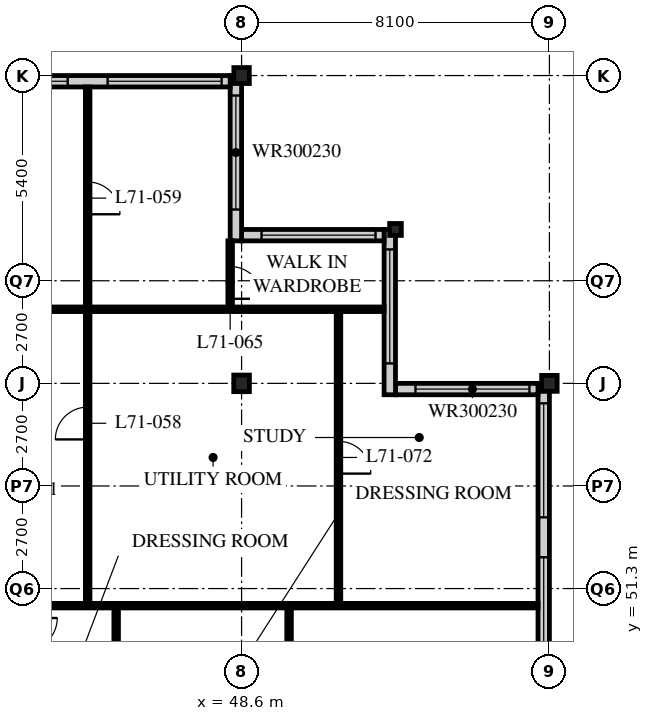
"""IFC4 building model, lengths in metres.
Left out: names, types, materials, properties, quantities, classifications, styles, units other than length and angle.
Written with IfcOpenShell. Run it as: python <this file> out.ifc"""

import sys

from ifc_helpers import new_model, si_unit, direction, frame, frame_2d, origin, origin_2d, place, context, subcontext, project, spatial, rectangle, i_section, extrude, element, fill, save


model = new_model("IFC4")
c1 = context("Model", 3, precision=1e-05, world=origin(), true_north=direction((0.0, 1.0)))
c2 = subcontext(c1, "Body", "Model", "MODEL_VIEW")
j1 = project(units=[si_unit("LENGTHUNIT", "METRE"), si_unit("PLANEANGLEUNIT", "RADIAN")], contexts=[c1])
p1 = place(None, origin())
s1 = spatial("IfcSite", under=j1, at=p1, CompositionType="ELEMENT")
p2 = place(p1, origin())
s2 = spatial("IfcBuilding", under=s1, at=p2, CompositionType="ELEMENT")
p3 = place(p2, frame((0.0, 0.0, 277.5)))
s3 = spatial("IfcBuildingStorey", under=s2, at=p3, CompositionType="ELEMENT", Elevation=277.5)
p4 = place(p3, frame((48.6, 56.7, 0.0), z_axis=(0.0, 0.0, 1.0), x_axis=(1.0, 0.0, 0.0)))
e1 = element("IfcColumn", 1, at=p4, inside=s3, PredefinedType="COLUMN", context=c2, shape_type="SweptSolid", body=[
    extrude(i_section(OverallWidth=0.412, OverallDepth=0.437, WebThickness=0.036, FlangeThickness=0.058, FilletRadius=0.015, at=origin_2d()), origin(), (0.0, 0.0, 1.0), 3.9),
])
p5 = place(p3, frame((48.6, 64.8, 0.0), z_axis=(0.0, 0.0, 1.0), x_axis=(1.0, 0.0, 0.0)))
e2 = element("IfcColumn", 2, at=p5, inside=s3, PredefinedType="COLUMN", context=c2, shape_type="SweptSolid", body=[
    extrude(i_section(OverallWidth=0.407, OverallDepth=0.419, WebThickness=0.031, FlangeThickness=0.049, FilletRadius=0.015, at=origin_2d()), origin(), (0.0, 0.0, 1.0), 3.9),
])
p6 = place(p3, frame((52.65, 60.75, 0.0), z_axis=(0.0, 0.0, 1.0), x_axis=(1.0, 0.0, 0.0)))
e3 = element("IfcColumn", 3, at=p6, inside=s3, PredefinedType="COLUMN", context=c2, shape_type="SweptSolid", body=[
    extrude(i_section(OverallWidth=0.307, OverallDepth=0.314, WebThickness=0.012, FlangeThickness=0.019, FilletRadius=0.015, at=origin_2d()), origin(), (0.0, 0.0, 1.0), 3.9),
])
p7 = place(p3, frame((56.7, 56.7, 0.0), z_axis=(0.0, 0.0, 1.0), x_axis=(1.0, 0.0, 0.0)))
e4 = element("IfcColumn", 4, at=p7, inside=s3, PredefinedType="COLUMN", context=c2, shape_type="SweptSolid", body=[
    extrude(i_section(OverallWidth=0.407, OverallDepth=0.419, WebThickness=0.031, FlangeThickness=0.049, FilletRadius=0.015, at=origin_2d()), origin(), (0.0, 0.0, 1.0), 3.9),
])
p8 = place(p3, frame((56.55, 24.6, 0.0), z_axis=(0.0, 0.0, 1.0), x_axis=(0.0, 1.0, 0.0)))
e5 = element("IfcWall", 5, at=p8, inside=s3, PredefinedType="SOLIDWALL", context=c2, shape_type="SweptSolid", body=[
    extrude(rectangle(XDim=32.1, YDim=0.3, at=frame_2d((16.05, 0.0))), origin(), (0.0, 0.0, 1.0), 3.69),
])
p9 = place(p8, frame((0.225, 0.0, 0.6)))
e6 = element("IfcOpeningElement", 6, at=p9, cuts=e5, PredefinedType="OPENING", context=c2, shape_type="SweptSolid", body=[
    extrude(rectangle(XDim=3.0, YDim=2.4, at=frame_2d((1.5, 1.2))), frame((0.0, 0.16, 0.0), z_axis=(0.0, -1.0, 0.0), x_axis=(1.0, 0.0, 0.0)), (0.0, 0.0, 1.0), 0.32),
])
p10 = place(p8, frame((4.275, 0.0, 0.6)))
e7 = element("IfcOpeningElement", 7, at=p10, cuts=e5, PredefinedType="OPENING", context=c2, shape_type="SweptSolid", body=[
    extrude(rectangle(XDim=3.0, YDim=2.4, at=frame_2d((1.5, 1.2))), frame((0.0, 0.16, 0.0), z_axis=(0.0, -1.0, 0.0), x_axis=(1.0, 0.0, 0.0)), (0.0, 0.0, 1.0), 0.32),
])
p11 = place(p8, frame((8.325, 0.0, 0.6)))
e8 = element("IfcOpeningElement", 8, at=p11, cuts=e5, PredefinedType="OPENING", context=c2, shape_type="SweptSolid", body=[
    extrude(rectangle(XDim=3.0, YDim=2.4, at=frame_2d((1.5, 1.2))), frame((0.0, 0.16, 0.0), z_axis=(0.0, -1.0, 0.0), x_axis=(1.0, 0.0, 0.0)), (0.0, 0.0, 1.0), 0.32),
])
p12 = place(p8, frame((12.375, 0.0, 0.6)))
e9 = element("IfcOpeningElement", 9, at=p12, cuts=e5, PredefinedType="OPENING", context=c2, shape_type="SweptSolid", body=[
    extrude(rectangle(XDim=3.0, YDim=2.4, at=frame_2d((1.5, 1.2))), frame((0.0, 0.16, 0.0), z_axis=(0.0, -1.0, 0.0), x_axis=(1.0, 0.0, 0.0)), (0.0, 0.0, 1.0), 0.32),
])
p13 = place(p8, frame((16.425, 0.0, 0.6)))
e10 = element("IfcOpeningElement", 10, at=p13, cuts=e5, PredefinedType="OPENING", context=c2, shape_type="SweptSolid", body=[
    extrude(rectangle(XDim=3.0, YDim=2.4, at=frame_2d((1.5, 1.2))), frame((0.0, 0.16, 0.0), z_axis=(0.0, -1.0, 0.0), x_axis=(1.0, 0.0, 0.0)), (0.0, 0.0, 1.0), 0.32),
])
p14 = place(p8, frame((20.475, 0.0, 0.6)))
e11 = element("IfcOpeningElement", 11, at=p14, cuts=e5, PredefinedType="OPENING", context=c2, shape_type="SweptSolid", body=[
    extrude(rectangle(XDim=3.0, YDim=2.4, at=frame_2d((1.5, 1.2))), frame((0.0, 0.16, 0.0), z_axis=(0.0, -1.0, 0.0), x_axis=(1.0, 0.0, 0.0)), (0.0, 0.0, 1.0), 0.32),
])
p15 = place(p8, frame((24.525, 0.0, 0.6)))
e12 = element("IfcOpeningElement", 12, at=p15, cuts=e5, PredefinedType="OPENING", context=c2, shape_type="SweptSolid", body=[
    extrude(rectangle(XDim=3.0, YDim=2.4, at=frame_2d((1.5, 1.2))), frame((0.0, 0.16, 0.0), z_axis=(0.0, -1.0, 0.0), x_axis=(1.0, 0.0, 0.0)), (0.0, 0.0, 1.0), 0.32),
])
p16 = place(p8, frame((28.575, 0.0, 0.6)))
e13 = element("IfcOpeningElement", 13, at=p16, cuts=e5, PredefinedType="OPENING", context=c2, shape_type="SweptSolid", body=[
    extrude(rectangle(XDim=3.0, YDim=2.4, at=frame_2d((1.5, 1.2))), frame((0.0, 0.16, 0.0), z_axis=(0.0, -1.0, 0.0), x_axis=(1.0, 0.0, 0.0)), (0.0, 0.0, 1.0), 0.32),
])
p17 = place(p3, frame((56.4, 56.55, 0.0), z_axis=(0.0, 0.0, 1.0), x_axis=(-1.0, 0.0, 0.0)))
e14 = element("IfcWall", 14, at=p17, inside=s3, PredefinedType="SOLIDWALL", context=c2, shape_type="SweptSolid", body=[
    extrude(rectangle(XDim=3.75, YDim=0.3, at=frame_2d((1.875, 0.0))), origin(), (0.0, 0.0, 1.0), 3.69),
])
p18 = place(p17, frame((0.225, 0.0, 0.6)))
e15 = element("IfcOpeningElement", 15, at=p18, cuts=e14, PredefinedType="OPENING", context=c2, shape_type="SweptSolid", body=[
    extrude(rectangle(XDim=3.0, YDim=2.3, at=frame_2d((1.5, 1.15))), frame((0.0, 0.16, 0.0), z_axis=(0.0, -1.0, 0.0), x_axis=(1.0, 0.0, 0.0)), (0.0, 0.0, 1.0), 0.32),
])
p19 = place(p3, frame((52.5, 56.4, 0.0), z_axis=(0.0, 0.0, 1.0), x_axis=(0.0, 1.0, 0.0)))
e16 = element("IfcWall", 16, at=p19, inside=s3, PredefinedType="SOLIDWALL", context=c2, shape_type="SweptSolid", body=[
    extrude(rectangle(XDim=4.35, YDim=0.3, at=frame_2d((2.175, 0.0))), origin(), (0.0, 0.0, 1.0), 3.69),
])
p20 = place(p19, frame((0.825, 0.0, 0.6)))
e17 = element("IfcOpeningElement", 17, at=p20, cuts=e16, PredefinedType="OPENING", context=c2, shape_type="SweptSolid", body=[
    extrude(rectangle(XDim=3.0, YDim=2.3, at=frame_2d((1.5, 1.15))), frame((0.0, 0.16, 0.0), z_axis=(0.0, -1.0, 0.0), x_axis=(1.0, 0.0, 0.0)), (0.0, 0.0, 1.0), 0.32),
])
p21 = place(p3, frame((52.35, 60.6, 0.0), z_axis=(0.0, 0.0, 1.0), x_axis=(-1.0, 0.0, 0.0)))
e18 = element("IfcWall", 18, at=p21, inside=s3, PredefinedType="SOLIDWALL", context=c2, shape_type="SweptSolid", body=[
    extrude(rectangle(XDim=3.75, YDim=0.3, at=frame_2d((1.875, 0.0))), origin(), (0.0, 0.0, 1.0), 3.69),
])
p22 = place(p21, frame((0.225, 0.0, 0.6)))
e19 = element("IfcOpeningElement", 19, at=p22, cuts=e18, PredefinedType="OPENING", context=c2, shape_type="SweptSolid", body=[
    extrude(rectangle(XDim=3.0, YDim=2.3, at=frame_2d((1.5, 1.15))), frame((0.0, 0.16, 0.0), z_axis=(0.0, -1.0, 0.0), x_axis=(1.0, 0.0, 0.0)), (0.0, 0.0, 1.0), 0.32),
])
p23 = place(p3, frame((48.45, 60.45, 0.0), z_axis=(0.0, 0.0, 1.0), x_axis=(0.0, 1.0, 0.0)))
e20 = element("IfcWall", 20, at=p23, inside=s3, PredefinedType="SOLIDWALL", context=c2, shape_type="SweptSolid", body=[
    extrude(rectangle(XDim=4.35, YDim=0.3, at=frame_2d((2.175, 0.0))), origin(), (0.0, 0.0, 1.0), 3.69),
])
p24 = place(p23, frame((0.825, 0.0, 0.6)))
e21 = element("IfcOpeningElement", 21, at=p24, cuts=e20, PredefinedType="OPENING", context=c2, shape_type="SweptSolid", body=[
    extrude(rectangle(XDim=3.0, YDim=2.3, at=frame_2d((1.5, 1.15))), frame((0.0, 0.16, 0.0), z_axis=(0.0, -1.0, 0.0), x_axis=(1.0, 0.0, 0.0)), (0.0, 0.0, 1.0), 0.32),
])
p25 = place(p3, frame((48.3, 64.65, 0.0), z_axis=(0.0, 0.0, 1.0), x_axis=(-1.0, 0.0, 0.0)))
e22 = element("IfcWall", 22, at=p25, inside=s3, PredefinedType="SOLIDWALL", context=c2, shape_type="SweptSolid", body=[
    extrude(rectangle(XDim=40.2, YDim=0.3, at=frame_2d((20.1, 0.0))), origin(), (0.0, 0.0, 1.0), 3.69),
])
p26 = place(p25, frame((0.225, 0.0, 0.6)))
e23 = element("IfcOpeningElement", 23, at=p26, cuts=e22, PredefinedType="OPENING", context=c2, shape_type="SweptSolid", body=[
    extrude(rectangle(XDim=3.0, YDim=2.4, at=frame_2d((1.5, 1.2))), frame((0.0, 0.16, 0.0), z_axis=(0.0, -1.0, 0.0), x_axis=(1.0, 0.0, 0.0)), (0.0, 0.0, 1.0), 0.32),
])
p27 = place(p25, frame((4.275, 0.0, 0.6)))
e24 = element("IfcOpeningElement", 24, at=p27, cuts=e22, PredefinedType="OPENING", context=c2, shape_type="SweptSolid", body=[
    extrude(rectangle(XDim=3.0, YDim=2.4, at=frame_2d((1.5, 1.2))), frame((0.0, 0.16, 0.0), z_axis=(0.0, -1.0, 0.0), x_axis=(1.0, 0.0, 0.0)), (0.0, 0.0, 1.0), 0.32),
])
p28 = place(p25, frame((8.325, 0.0, 0.6)))
e25 = element("IfcOpeningElement", 25, at=p28, cuts=e22, PredefinedType="OPENING", context=c2, shape_type="SweptSolid", body=[
    extrude(rectangle(XDim=3.0, YDim=2.4, at=frame_2d((1.5, 1.2))), frame((0.0, 0.16, 0.0), z_axis=(0.0, -1.0, 0.0), x_axis=(1.0, 0.0, 0.0)), (0.0, 0.0, 1.0), 0.32),
])
p29 = place(p25, frame((12.375, 0.0, 0.6)))
e26 = element("IfcOpeningElement", 26, at=p29, cuts=e22, PredefinedType="OPENING", context=c2, shape_type="SweptSolid", body=[
    extrude(rectangle(XDim=3.0, YDim=2.4, at=frame_2d((1.5, 1.2))), frame((0.0, 0.16, 0.0), z_axis=(0.0, -1.0, 0.0), x_axis=(1.0, 0.0, 0.0)), (0.0, 0.0, 1.0), 0.32),
])
p30 = place(p25, frame((16.425, 0.0, 0.6)))
e27 = element("IfcOpeningElement", 27, at=p30, cuts=e22, PredefinedType="OPENING", context=c2, shape_type="SweptSolid", body=[
    extrude(rectangle(XDim=3.0, YDim=2.4, at=frame_2d((1.5, 1.2))), frame((0.0, 0.16, 0.0), z_axis=(0.0, -1.0, 0.0), x_axis=(1.0, 0.0, 0.0)), (0.0, 0.0, 1.0), 0.32),
])
p31 = place(p25, frame((20.475, 0.0, 0.6)))
e28 = element("IfcOpeningElement", 28, at=p31, cuts=e22, PredefinedType="OPENING", context=c2, shape_type="SweptSolid", body=[
    extrude(rectangle(XDim=3.0, YDim=2.4, at=frame_2d((1.5, 1.2))), frame((0.0, 0.16, 0.0), z_axis=(0.0, -1.0, 0.0), x_axis=(1.0, 0.0, 0.0)), (0.0, 0.0, 1.0), 0.32),
])
p32 = place(p25, frame((24.525, 0.0, 0.6)))
e29 = element("IfcOpeningElement", 29, at=p32, cuts=e22, PredefinedType="OPENING", context=c2, shape_type="SweptSolid", body=[
    extrude(rectangle(XDim=3.0, YDim=2.4, at=frame_2d((1.5, 1.2))), frame((0.0, 0.16, 0.0), z_axis=(0.0, -1.0, 0.0), x_axis=(1.0, 0.0, 0.0)), (0.0, 0.0, 1.0), 0.32),
])
p33 = place(p25, frame((28.575, 0.0, 0.6)))
e30 = element("IfcOpeningElement", 30, at=p33, cuts=e22, PredefinedType="OPENING", context=c2, shape_type="SweptSolid", body=[
    extrude(rectangle(XDim=3.0, YDim=2.4, at=frame_2d((1.5, 1.2))), frame((0.0, 0.16, 0.0), z_axis=(0.0, -1.0, 0.0), x_axis=(1.0, 0.0, 0.0)), (0.0, 0.0, 1.0), 0.32),
])
p34 = place(p25, frame((32.625, 0.0, 0.6)))
e31 = element("IfcOpeningElement", 31, at=p34, cuts=e22, PredefinedType="OPENING", context=c2, shape_type="SweptSolid", body=[
    extrude(rectangle(XDim=3.0, YDim=2.4, at=frame_2d((1.5, 1.2))), frame((0.0, 0.16, 0.0), z_axis=(0.0, -1.0, 0.0), x_axis=(1.0, 0.0, 0.0)), (0.0, 0.0, 1.0), 0.32),
])
p35 = place(p25, frame((36.675, 0.0, 0.6)))
e32 = element("IfcOpeningElement", 32, at=p35, cuts=e22, PredefinedType="OPENING", context=c2, shape_type="SweptSolid", body=[
    extrude(rectangle(XDim=3.0, YDim=2.4, at=frame_2d((1.5, 1.2))), frame((0.0, 0.16, 0.0), z_axis=(0.0, -1.0, 0.0), x_axis=(1.0, 0.0, 0.0)), (0.0, 0.0, 1.0), 0.32),
])
p36 = place(p3, frame((42.9, 50.85, 0.0), z_axis=(0.0, 0.0, 1.0), x_axis=(1.0, 0.0, 0.0)))
e33 = element("IfcWall", 33, at=p36, inside=s3, PredefinedType="PARTITIONING", context=c2, shape_type="SweptSolid", body=[
    extrude(rectangle(XDim=13.5, YDim=0.12, at=frame_2d((6.75, 0.0))), origin(), (0.0, 0.0, 1.0), 3.69),
])
p37 = place(p3, frame((36.45, 58.65, 0.0), z_axis=(0.0, 0.0, 1.0), x_axis=(1.0, 0.0, 0.0)))
e34 = element("IfcWall", 34, at=p37, inside=s3, PredefinedType="PARTITIONING", context=c2, shape_type="SweptSolid", body=[
    extrude(rectangle(XDim=15.9, YDim=0.12, at=frame_2d((7.95, 0.0))), origin(), (0.0, 0.0, 1.0), 3.69),
])
p38 = place(p37, frame((1.675, 0.0, 0.0)))
e35 = element("IfcOpeningElement", 35, at=p38, cuts=e34, PredefinedType="OPENING", context=c2, shape_type="SweptSolid", body=[
    extrude(rectangle(XDim=0.85, YDim=2.1, at=frame_2d((0.425, 1.05))), frame((0.0, 0.07, 0.0), z_axis=(0.0, -1.0, 0.0), x_axis=(1.0, 0.0, 0.0)), (0.0, 0.0, 1.0), 0.14),
])
p39 = place(p3, frame((44.55, 64.5, 0.0), z_axis=(0.0, 0.0, 1.0), x_axis=(0.0, -1.0, 0.0)))
e36 = element("IfcWall", 36, at=p39, inside=s3, PredefinedType="PARTITIONING", context=c2, shape_type="SweptSolid", body=[
    extrude(rectangle(XDim=13.65, YDim=0.12, at=frame_2d((6.825, 0.0))), origin(), (0.0, 0.0, 1.0), 3.69),
])
p40 = place(p39, frame((8.425, 0.0, 0.0)))
e37 = element("IfcOpeningElement", 37, at=p40, cuts=e36, PredefinedType="OPENING", context=c2, shape_type="SweptSolid", body=[
    extrude(rectangle(XDim=0.85, YDim=2.1, at=frame_2d((0.425, 1.05))), frame((0.0, 0.07, 0.0), z_axis=(0.0, -1.0, 0.0), x_axis=(1.0, 0.0, 0.0)), (0.0, 0.0, 1.0), 0.14),
])
p41 = place(p39, frame((2.5, 0.0, 0.0)))
e38 = element("IfcOpeningElement", 38, at=p41, cuts=e36, PredefinedType="OPENING", context=c2, shape_type="SweptSolid", body=[
    extrude(rectangle(XDim=0.85, YDim=2.1, at=frame_2d((0.425, 1.05))), frame((0.0, 0.07, 0.0), z_axis=(0.0, -1.0, 0.0), x_axis=(1.0, 0.0, 0.0)), (0.0, 0.0, 1.0), 0.14),
])
p42 = place(p3, frame((48.3, 58.65, 0.0), z_axis=(0.0, 0.0, 1.0), x_axis=(0.0, 1.0, 0.0)))
e39 = element("IfcWall", 39, at=p42, inside=s3, PredefinedType="PARTITIONING", context=c2, shape_type="SweptSolid", body=[
    extrude(rectangle(XDim=1.8, YDim=0.12, at=frame_2d((0.9, 0.0))), origin(), (0.0, 0.0, 1.0), 3.69),
])
p43 = place(p42, frame((0.275, 0.0, 0.0)))
e40 = element("IfcOpeningElement", 40, at=p43, cuts=e39, PredefinedType="OPENING", context=c2, shape_type="SweptSolid", body=[
    extrude(rectangle(XDim=0.85, YDim=2.1, at=frame_2d((0.425, 1.05))), frame((0.0, 0.07, 0.0), z_axis=(0.0, -1.0, 0.0), x_axis=(1.0, 0.0, 0.0)), (0.0, 0.0, 1.0), 0.14),
])
p44 = place(p3, frame((45.3, 50.85, 0.0), z_axis=(0.0, 0.0, 1.0), x_axis=(0.0, -1.0, 0.0)))
e41 = element("IfcWall", 41, at=p44, inside=s3, PredefinedType="PARTITIONING", context=c2, shape_type="SweptSolid", body=[
    extrude(rectangle(XDim=4.01, YDim=0.12, at=frame_2d((2.005, 0.0))), origin(), (0.0, 0.0, 1.0), 3.69),
])
p45 = place(p44, frame((2.885, 0.0, 0.0)))
e42 = element("IfcOpeningElement", 42, at=p45, cuts=e41, PredefinedType="OPENING", context=c2, shape_type="SweptSolid", body=[
    extrude(rectangle(XDim=0.85, YDim=2.1, at=frame_2d((0.425, 1.05))), frame((0.0, 0.07, 0.0), z_axis=(0.0, -1.0, 0.0), x_axis=(1.0, 0.0, 0.0)), (0.0, 0.0, 1.0), 0.14),
])
p46 = place(p3, frame((51.15, 50.85, 0.0), z_axis=(0.0, 0.0, 1.0), x_axis=(0.0, 1.0, 0.0)))
e43 = element("IfcWall", 43, at=p46, inside=s3, PredefinedType="PARTITIONING", context=c2, shape_type="SweptSolid", body=[
    extrude(rectangle(XDim=7.8, YDim=0.12, at=frame_2d((3.9, 0.0))), origin(), (0.0, 0.0, 1.0), 3.69),
])
p47 = place(p46, frame((3.475, 0.0, 0.0)))
e44 = element("IfcOpeningElement", 44, at=p47, cuts=e43, PredefinedType="OPENING", context=c2, shape_type="SweptSolid", body=[
    extrude(rectangle(XDim=0.85, YDim=2.1, at=frame_2d((0.425, 1.05))), frame((0.0, 0.07, 0.0), z_axis=(0.0, -1.0, 0.0), x_axis=(1.0, 0.0, 0.0)), (0.0, 0.0, 1.0), 0.14),
])
p48 = place(p3, frame((49.85, 44.55, 0.0), z_axis=(0.0, 0.0, 1.0), x_axis=(0.0, 1.0, 0.0)))
e45 = element("IfcWall", 45, at=p48, inside=s3, PredefinedType="PARTITIONING", context=c2, shape_type="SweptSolid", body=[
    extrude(rectangle(XDim=6.3, YDim=0.12, at=frame_2d((3.15, 0.0))), origin(), (0.0, 0.0, 1.0), 3.69),
])
p49 = place(p48, frame((2.725, 0.0, 0.0)))
e46 = element("IfcOpeningElement", 46, at=p49, cuts=e45, PredefinedType="OPENING", context=c2, shape_type="SweptSolid", body=[
    extrude(rectangle(XDim=0.85, YDim=2.1, at=frame_2d((0.425, 1.05))), frame((0.0, 0.07, 0.0), z_axis=(0.0, -1.0, 0.0), x_axis=(1.0, 0.0, 0.0)), (0.0, 0.0, 1.0), 0.14),
])
p50 = place(p15, origin())
e47 = element("IfcWindow", 47, at=p50, inside=s3, PartitioningType="SINGLE_PANEL", PredefinedType="WINDOW", context=c2, shape_type="SweptSolid", body=[
    extrude(rectangle(XDim=3.0, YDim=2.4, at=frame_2d((1.5, 1.2))), frame((0.0, 0.03, 0.0), z_axis=(0.0, -1.0, 0.0), x_axis=(1.0, 0.0, 0.0)), (0.0, 0.0, 1.0), 0.06),
])
fill(e12, e47)
p51 = place(p16, origin())
e48 = element("IfcWindow", 48, at=p51, inside=s3, PartitioningType="SINGLE_PANEL", PredefinedType="WINDOW", context=c2, shape_type="SweptSolid", body=[
    extrude(rectangle(XDim=3.0, YDim=2.4, at=frame_2d((1.5, 1.2))), frame((0.0, 0.03, 0.0), z_axis=(0.0, -1.0, 0.0), x_axis=(1.0, 0.0, 0.0)), (0.0, 0.0, 1.0), 0.06),
])
fill(e13, e48)
p52 = place(p18, origin())
e49 = element("IfcWindow", 49, at=p52, inside=s3, PartitioningType="SINGLE_PANEL", PredefinedType="WINDOW", context=c2, shape_type="SweptSolid", body=[
    extrude(rectangle(XDim=3.0, YDim=2.3, at=frame_2d((1.5, 1.15))), frame((0.0, 0.03, 0.0), z_axis=(0.0, -1.0, 0.0), x_axis=(1.0, 0.0, 0.0)), (0.0, 0.0, 1.0), 0.06),
])
fill(e15, e49)
p53 = place(p20, origin())
e50 = element("IfcWindow", 50, at=p53, inside=s3, PartitioningType="SINGLE_PANEL", PredefinedType="WINDOW", context=c2, shape_type="SweptSolid", body=[
    extrude(rectangle(XDim=3.0, YDim=2.3, at=frame_2d((1.5, 1.15))), frame((0.0, 0.03, 0.0), z_axis=(0.0, -1.0, 0.0), x_axis=(1.0, 0.0, 0.0)), (0.0, 0.0, 1.0), 0.06),
])
fill(e17, e50)
p54 = place(p22, origin())
e51 = element("IfcWindow", 51, at=p54, inside=s3, PartitioningType="SINGLE_PANEL", PredefinedType="WINDOW", context=c2, shape_type="SweptSolid", body=[
    extrude(rectangle(XDim=3.0, YDim=2.3, at=frame_2d((1.5, 1.15))), frame((0.0, 0.03, 0.0), z_axis=(0.0, -1.0, 0.0), x_axis=(1.0, 0.0, 0.0)), (0.0, 0.0, 1.0), 0.06),
])
fill(e19, e51)
p55 = place(p24, origin())
e52 = element("IfcWindow", 52, at=p55, inside=s3, PartitioningType="SINGLE_PANEL", PredefinedType="WINDOW", context=c2, shape_type="SweptSolid", body=[
    extrude(rectangle(XDim=3.0, YDim=2.3, at=frame_2d((1.5, 1.15))), frame((0.0, 0.03, 0.0), z_axis=(0.0, -1.0, 0.0), x_axis=(1.0, 0.0, 0.0)), (0.0, 0.0, 1.0), 0.06),
])
fill(e21, e52)
p56 = place(p26, origin())
e53 = element("IfcWindow", 53, at=p56, inside=s3, PartitioningType="SINGLE_PANEL", PredefinedType="WINDOW", context=c2, shape_type="SweptSolid", body=[
    extrude(rectangle(XDim=3.0, YDim=2.4, at=frame_2d((1.5, 1.2))), frame((0.0, 0.03, 0.0), z_axis=(0.0, -1.0, 0.0), x_axis=(1.0, 0.0, 0.0)), (0.0, 0.0, 1.0), 0.06),
])
fill(e23, e53)
p57 = place(p27, origin())
e54 = element("IfcWindow", 54, at=p57, inside=s3, PartitioningType="SINGLE_PANEL", PredefinedType="WINDOW", context=c2, shape_type="SweptSolid", body=[
    extrude(rectangle(XDim=3.0, YDim=2.4, at=frame_2d((1.5, 1.2))), frame((0.0, 0.03, 0.0), z_axis=(0.0, -1.0, 0.0), x_axis=(1.0, 0.0, 0.0)), (0.0, 0.0, 1.0), 0.06),
])
fill(e24, e54)
p58 = place(p40, origin())
e55 = element("IfcDoor", 55, at=p58, inside=s3, OperationType="SINGLE_SWING_LEFT", PredefinedType="DOOR", context=c2, shape_type="SweptSolid", body=[
    extrude(rectangle(XDim=0.85, YDim=2.1, at=frame_2d((0.425, 1.05))), frame((0.0, 0.025, 0.0), z_axis=(0.0, -1.0, 0.0), x_axis=(1.0, 0.0, 0.0)), (0.0, 0.0, 1.0), 0.05),
])
fill(e37, e55)
p59 = place(p41, origin())
e56 = element("IfcDoor", 56, at=p59, inside=s3, OperationType="SINGLE_SWING_RIGHT", PredefinedType="DOOR", context=c2, shape_type="SweptSolid", body=[
    extrude(rectangle(XDim=0.85, YDim=2.1, at=frame_2d((0.425, 1.05))), frame((0.0, 0.025, 0.0), z_axis=(0.0, -1.0, 0.0), x_axis=(1.0, 0.0, 0.0)), (0.0, 0.0, 1.0), 0.05),
])
fill(e38, e56)
p60 = place(p43, origin())
e57 = element("IfcDoor", 57, at=p60, inside=s3, OperationType="SINGLE_SWING_RIGHT", PredefinedType="DOOR", context=c2, shape_type="SweptSolid", body=[
    extrude(rectangle(XDim=0.85, YDim=2.1, at=frame_2d((0.425, 1.05))), frame((0.0, 0.025, 0.0), z_axis=(0.0, -1.0, 0.0), x_axis=(1.0, 0.0, 0.0)), (0.0, 0.0, 1.0), 0.05),
])
fill(e40, e57)
p61 = place(p47, origin())
e58 = element("IfcDoor", 58, at=p61, inside=s3, OperationType="SINGLE_SWING_RIGHT", PredefinedType="DOOR", context=c2, shape_type="SweptSolid", body=[
    extrude(rectangle(XDim=0.85, YDim=2.1, at=frame_2d((0.425, 1.05))), frame((0.0, 0.025, 0.0), z_axis=(0.0, -1.0, 0.0), x_axis=(1.0, 0.0, 0.0)), (0.0, 0.0, 1.0), 0.05),
])
fill(e44, e58)
save(model, sys.argv[1])
